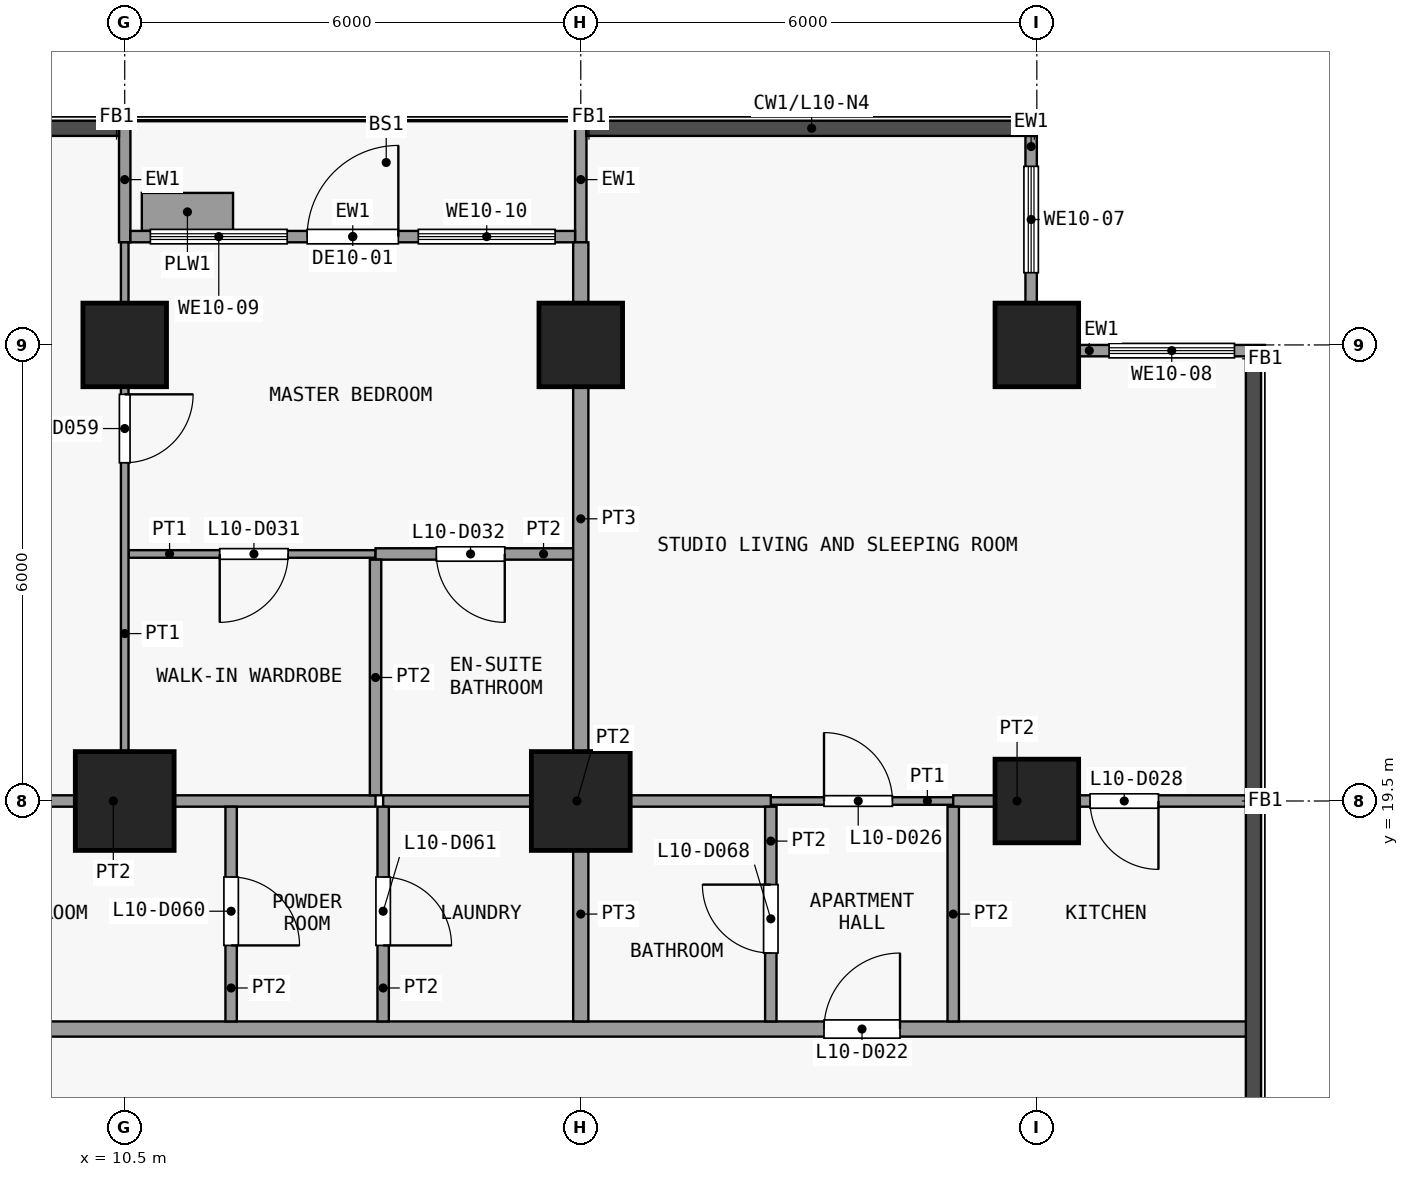
"""IFC4 building model, lengths in metres.
Left out: names, types, materials, properties, quantities, classifications, styles, units other than length and angle.
Written with IfcOpenShell. Run it as: python <this file> out.ifc"""

import sys

from ifc_helpers import new_model, si_unit, direction, frame, frame_2d, origin, origin_2d, place, context, subcontext, project, spatial, rectangle, extrude, element, fill, save


model = new_model("IFC4")
c1 = context("Model", 3, precision=1e-05, world=origin(), true_north=direction((0.0, 1.0)))
c2 = subcontext(c1, "Body", "Model", "MODEL_VIEW")
j1 = project(units=[si_unit("LENGTHUNIT", "METRE"), si_unit("PLANEANGLEUNIT", "RADIAN")], contexts=[c1])
p1 = place(None, origin())
s1 = spatial("IfcSite", under=j1, at=p1, CompositionType="ELEMENT")
p2 = place(p1, origin())
s2 = spatial("IfcBuilding", under=s1, at=p2, CompositionType="ELEMENT")
p3 = place(p2, frame((0.0, 0.0, 46.9)))
s3 = spatial("IfcBuildingStorey", under=s2, at=p3, CompositionType="ELEMENT", Elevation=46.9)
p4 = place(p3, frame((10.5, 19.5, 0.0), z_axis=(0.0, 0.0, 1.0), x_axis=(1.0, 0.0, 0.0)))
e1 = element("IfcColumn", 1, at=p4, inside=s3, PredefinedType="COLUMN", context=c2, shape_type="SweptSolid", body=[
    extrude(rectangle(XDim=1.3, YDim=1.3, at=origin_2d()), origin(), (0.0, 0.0, 1.0), 3.6),
])
p5 = place(p3, frame((10.5, 25.5, 0.0), z_axis=(0.0, 0.0, 1.0), x_axis=(1.0, 0.0, 0.0)))
e2 = element("IfcColumn", 2, at=p5, inside=s3, PredefinedType="COLUMN", context=c2, shape_type="SweptSolid", body=[
    extrude(rectangle(XDim=1.1, YDim=1.1, at=origin_2d()), origin(), (0.0, 0.0, 1.0), 3.6),
])
p6 = place(p3, frame((16.5, 19.5, 0.0), z_axis=(0.0, 0.0, 1.0), x_axis=(1.0, 0.0, 0.0)))
e3 = element("IfcColumn", 3, at=p6, inside=s3, PredefinedType="COLUMN", context=c2, shape_type="SweptSolid", body=[
    extrude(rectangle(XDim=1.3, YDim=1.3, at=origin_2d()), origin(), (0.0, 0.0, 1.0), 3.6),
])
for number, where, z_axis, x_axis in (
    (4, (16.5, 25.5, 0.0), (0.0, 0.0, 1.0), (1.0, 0.0, 0.0)),
    (5, (22.5, 19.5, 0.0), (0.0, 0.0, 1.0), (1.0, 0.0, 0.0)),
    (6, (22.5, 25.5, 0.0), (0.0, 0.0, 1.0), (1.0, 0.0, 0.0)),
):
    element("IfcColumn", number, at=place(p3, frame(where, z_axis=z_axis, x_axis=x_axis)), inside=s3, PredefinedType="COLUMN", context=c2, shape_type="SweptSolid", body=[
        extrude(rectangle(XDim=1.1, YDim=1.1, at=origin_2d()), origin(), (0.0, 0.0, 1.0), 3.6),
    ])
p7 = place(p3, frame((22.425, 28.25, 0.0), z_axis=(0.0, 0.0, 1.0), x_axis=(0.0, -1.0, 0.0)))
e7 = element("IfcWall", 7, at=p7, inside=s3, PredefinedType="SOLIDWALL", context=c2, shape_type="SweptSolid", body=[
    extrude(rectangle(XDim=2.2, YDim=0.15, at=frame_2d((1.1, 0.0))), origin(), (0.0, 0.0, 1.0), 3.3),
])
p8 = place(p7, frame((0.4, 0.0, 0.9)))
e8 = element("IfcOpeningElement", 8, at=p8, cuts=e7, PredefinedType="OPENING", context=c2, shape_type="SweptSolid", body=[
    extrude(rectangle(XDim=1.4, YDim=2.4, at=frame_2d((0.7, 1.2))), frame((0.0, 0.085, 0.0), z_axis=(0.0, -1.0, 0.0), x_axis=(1.0, 0.0, 0.0)), (0.0, 0.0, 1.0), 0.17),
])
p9 = place(p3, frame((23.05, 25.425, 0.0), z_axis=(0.0, 0.0, 1.0), x_axis=(1.0, 0.0, 0.0)))
e9 = element("IfcWall", 9, at=p9, inside=s3, PredefinedType="SOLIDWALL", context=c2, shape_type="SweptSolid", body=[
    extrude(rectangle(XDim=2.45, YDim=0.15, at=frame_2d((1.225, 0.0))), origin(), (0.0, 0.0, 1.0), 3.3),
])
p10 = place(p9, frame((0.4, 0.0, 0.9)))
e10 = element("IfcOpeningElement", 10, at=p10, cuts=e9, PredefinedType="OPENING", context=c2, shape_type="SweptSolid", body=[
    extrude(rectangle(XDim=1.65, YDim=2.4, at=frame_2d((0.825, 1.2))), frame((0.0, 0.085, 0.0), z_axis=(0.0, -1.0, 0.0), x_axis=(1.0, 0.0, 0.0)), (0.0, 0.0, 1.0), 0.17),
])
for number, where, z_axis, x_axis in (
    (11, (10.5, 26.85, 0.0), (0.0, 0.0, 1.0), (0.0, 1.0, 0.0)),
    (12, (16.5, 26.85, 0.0), (0.0, 0.0, 1.0), (0.0, 1.0, 0.0)),
):
    element("IfcWall", number, at=place(p3, frame(where, z_axis=z_axis, x_axis=x_axis)), inside=s3, PredefinedType="SOLIDWALL", context=c2, shape_type="SweptSolid", body=[
        extrude(rectangle(XDim=1.65, YDim=0.15, at=frame_2d((0.825, 0.0))), origin(), (0.0, 0.0, 1.0), 3.3),
    ])
p11 = place(p3, frame((10.575, 26.925, 0.0), z_axis=(0.0, 0.0, 1.0), x_axis=(1.0, 0.0, 0.0)))
e13 = element("IfcWall", 13, at=p11, inside=s3, PredefinedType="SOLIDWALL", context=c2, shape_type="SweptSolid", body=[
    extrude(rectangle(XDim=5.85, YDim=0.15, at=frame_2d((2.925, 0.0))), origin(), (0.0, 0.0, 1.0), 3.3),
])
p12 = place(p11, frame((2.325, 0.0, 0.0)))
e14 = element("IfcOpeningElement", 14, at=p12, cuts=e13, PredefinedType="OPENING", context=c2, shape_type="SweptSolid", body=[
    extrude(rectangle(XDim=1.2, YDim=2.4, at=frame_2d((0.6, 1.2))), frame((0.0, 0.085, 0.0), z_axis=(0.0, -1.0, 0.0), x_axis=(1.0, 0.0, 0.0)), (0.0, 0.0, 1.0), 0.17),
])
p13 = place(p11, frame((0.262, 0.0, 0.9)))
e15 = element("IfcOpeningElement", 15, at=p13, cuts=e13, PredefinedType="OPENING", context=c2, shape_type="SweptSolid", body=[
    extrude(rectangle(XDim=1.8, YDim=2.1, at=frame_2d((0.9, 1.05))), frame((0.0, 0.085, 0.0), z_axis=(0.0, -1.0, 0.0), x_axis=(1.0, 0.0, 0.0)), (0.0, 0.0, 1.0), 0.17),
])
p14 = place(p11, frame((3.788, 0.0, 0.9)))
e16 = element("IfcOpeningElement", 16, at=p14, cuts=e13, PredefinedType="OPENING", context=c2, shape_type="SweptSolid", body=[
    extrude(rectangle(XDim=1.8, YDim=2.1, at=frame_2d((0.9, 1.05))), frame((0.0, 0.085, 0.0), z_axis=(0.0, -1.0, 0.0), x_axis=(1.0, 0.0, 0.0)), (0.0, 0.0, 1.0), 0.17),
])
p15 = place(p3, frame((10.725, 27.25, 0.0), z_axis=(0.0, 0.0, 1.0), x_axis=(1.0, 0.0, 0.0)))
e17 = element("IfcWall", 17, at=p15, inside=s3, PredefinedType="USERDEFINED", context=c2, shape_type="SweptSolid", body=[
    extrude(rectangle(XDim=1.2, YDim=0.5, at=frame_2d((0.6, 0.0))), origin(), (0.0, 0.0, 1.0), 0.9),
])
p16 = place(p3, frame((-25.35, 16.5, 0.0), z_axis=(0.0, 0.0, 1.0), x_axis=(1.0, 0.0, 0.0)))
e18 = element("IfcWall", 18, at=p16, inside=s3, PredefinedType="PARTITIONING", context=c2, shape_type="SweptSolid", body=[
    extrude(rectangle(XDim=50.7, YDim=0.2, at=frame_2d((25.35, 0.0))), origin(), (0.0, 0.0, 1.0), 3.3),
])
p17 = place(p16, frame((7.05, 0.0, 0.0)))
e19 = element("IfcOpeningElement", 19, at=p17, cuts=e18, PredefinedType="OPENING", context=c2, shape_type="SweptSolid", body=[
    extrude(rectangle(XDim=1.0, YDim=2.1, at=frame_2d((0.5, 1.05))), frame((0.0, 0.11, 0.0), z_axis=(0.0, -1.0, 0.0), x_axis=(1.0, 0.0, 0.0)), (0.0, 0.0, 1.0), 0.22),
])
p18 = place(p16, frame((15.55, 0.0, 0.0)))
e20 = element("IfcOpeningElement", 20, at=p18, cuts=e18, PredefinedType="OPENING", context=c2, shape_type="SweptSolid", body=[
    extrude(rectangle(XDim=1.0, YDim=2.1, at=frame_2d((0.5, 1.05))), frame((0.0, 0.11, 0.0), z_axis=(0.0, -1.0, 0.0), x_axis=(1.0, 0.0, 0.0)), (0.0, 0.0, 1.0), 0.22),
])
p19 = place(p16, frame((30.55, 0.0, 0.0)))
e21 = element("IfcOpeningElement", 21, at=p19, cuts=e18, PredefinedType="OPENING", context=c2, shape_type="SweptSolid", body=[
    extrude(rectangle(XDim=1.0, YDim=2.1, at=frame_2d((0.5, 1.05))), frame((0.0, 0.11, 0.0), z_axis=(0.0, -1.0, 0.0), x_axis=(1.0, 0.0, 0.0)), (0.0, 0.0, 1.0), 0.22),
])
p20 = place(p16, frame((45.05, 0.0, 0.0)))
e22 = element("IfcOpeningElement", 22, at=p20, cuts=e18, PredefinedType="OPENING", context=c2, shape_type="SweptSolid", body=[
    extrude(rectangle(XDim=1.0, YDim=2.1, at=frame_2d((0.5, 1.05))), frame((0.0, 0.11, 0.0), z_axis=(0.0, -1.0, 0.0), x_axis=(1.0, 0.0, 0.0)), (0.0, 0.0, 1.0), 0.22),
])
p21 = place(p3, frame((19.0, 19.5, 0.0), z_axis=(0.0, 0.0, 1.0), x_axis=(1.0, 0.0, 0.0)))
e23 = element("IfcWall", 23, at=p21, inside=s3, PredefinedType="PARTITIONING", context=c2, shape_type="SweptSolid", body=[
    extrude(rectangle(XDim=2.4, YDim=0.1, at=frame_2d((1.2, 0.0))), origin(), (0.0, 0.0, 1.0), 3.3),
])
p22 = place(p21, frame((0.7, 0.0, 0.0)))
e24 = element("IfcOpeningElement", 24, at=p22, cuts=e23, PredefinedType="OPENING", context=c2, shape_type="SweptSolid", body=[
    extrude(rectangle(XDim=0.9, YDim=2.1, at=frame_2d((0.45, 1.05))), frame((0.0, 0.06, 0.0), z_axis=(0.0, -1.0, 0.0), x_axis=(1.0, 0.0, 0.0)), (0.0, 0.0, 1.0), 0.12),
])
p23 = place(p3, frame((6.9, 19.5, 0.0), z_axis=(0.0, 0.0, 1.0), x_axis=(1.0, 0.0, 0.0)))
e25 = element("IfcWall", 25, at=p23, inside=s3, PredefinedType="PARTITIONING", context=c2, shape_type="SweptSolid", body=[
    extrude(rectangle(XDim=6.9, YDim=0.15, at=frame_2d((3.45, 0.0))), origin(), (0.0, 0.0, 1.0), 3.3),
])
p24 = place(p3, frame((13.9, 19.5, 0.0), z_axis=(0.0, 0.0, 1.0), x_axis=(1.0, 0.0, 0.0)))
e26 = element("IfcWall", 26, at=p24, inside=s3, PredefinedType="PARTITIONING", context=c2, shape_type="SweptSolid", body=[
    extrude(rectangle(XDim=5.1, YDim=0.15, at=frame_2d((2.55, 0.0))), origin(), (0.0, 0.0, 1.0), 3.3),
])
p25 = place(p3, frame((21.4, 19.5, 0.0), z_axis=(0.0, 0.0, 1.0), x_axis=(1.0, 0.0, 0.0)))
e27 = element("IfcWall", 27, at=p25, inside=s3, PredefinedType="PARTITIONING", context=c2, shape_type="SweptSolid", body=[
    extrude(rectangle(XDim=3.85, YDim=0.15, at=frame_2d((1.925, 0.0))), origin(), (0.0, 0.0, 1.0), 3.3),
])
p26 = place(p25, frame((1.8, 0.0, 0.0)))
e28 = element("IfcOpeningElement", 28, at=p26, cuts=e27, PredefinedType="OPENING", context=c2, shape_type="SweptSolid", body=[
    extrude(rectangle(XDim=0.9, YDim=2.1, at=frame_2d((0.45, 1.05))), frame((0.0, 0.085, 0.0), z_axis=(0.0, -1.0, 0.0), x_axis=(1.0, 0.0, 0.0)), (0.0, 0.0, 1.0), 0.17),
])
p27 = place(p3, frame((10.55, 22.75, 0.0), z_axis=(0.0, 0.0, 1.0), x_axis=(1.0, 0.0, 0.0)))
e29 = element("IfcWall", 29, at=p27, inside=s3, PredefinedType="PARTITIONING", context=c2, shape_type="SweptSolid", body=[
    extrude(rectangle(XDim=3.25, YDim=0.1, at=frame_2d((1.625, 0.0))), origin(), (0.0, 0.0, 1.0), 3.3),
])
p28 = place(p27, frame((1.2, 0.0, 0.0)))
e30 = element("IfcOpeningElement", 30, at=p28, cuts=e29, PredefinedType="OPENING", context=c2, shape_type="SweptSolid", body=[
    extrude(rectangle(XDim=0.9, YDim=2.1, at=frame_2d((0.45, 1.05))), frame((0.0, 0.06, 0.0), z_axis=(0.0, -1.0, 0.0), x_axis=(1.0, 0.0, 0.0)), (0.0, 0.0, 1.0), 0.12),
])
p29 = place(p3, frame((13.8, 22.75, 0.0), z_axis=(0.0, 0.0, 1.0), x_axis=(1.0, 0.0, 0.0)))
e31 = element("IfcWall", 31, at=p29, inside=s3, PredefinedType="PARTITIONING", context=c2, shape_type="SweptSolid", body=[
    extrude(rectangle(XDim=2.6, YDim=0.15, at=frame_2d((1.3, 0.0))), origin(), (0.0, 0.0, 1.0), 3.3),
])
p30 = place(p29, frame((0.8, 0.0, 0.0)))
e32 = element("IfcOpeningElement", 32, at=p30, cuts=e31, PredefinedType="OPENING", context=c2, shape_type="SweptSolid", body=[
    extrude(rectangle(XDim=0.9, YDim=2.1, at=frame_2d((0.45, 1.05))), frame((0.0, 0.085, 0.0), z_axis=(0.0, -1.0, 0.0), x_axis=(1.0, 0.0, 0.0)), (0.0, 0.0, 1.0), 0.17),
])
p31 = place(p3, frame((10.5, 19.575, 0.0), z_axis=(0.0, 0.0, 1.0), x_axis=(0.0, 1.0, 0.0)))
e33 = element("IfcWall", 33, at=p31, inside=s3, PredefinedType="PARTITIONING", context=c2, shape_type="SweptSolid", body=[
    extrude(rectangle(XDim=7.275, YDim=0.1, at=frame_2d((3.638, 0.0))), origin(), (0.0, 0.0, 1.0), 3.3),
])
p32 = place(p31, frame((4.375, 0.0, 0.0)))
e34 = element("IfcOpeningElement", 34, at=p32, cuts=e33, PredefinedType="OPENING", context=c2, shape_type="SweptSolid", body=[
    extrude(rectangle(XDim=0.9, YDim=2.1, at=frame_2d((0.45, 1.05))), frame((0.0, 0.06, 0.0), z_axis=(0.0, -1.0, 0.0), x_axis=(1.0, 0.0, 0.0)), (0.0, 0.0, 1.0), 0.12),
])
p33 = place(p3, frame((11.9, 16.6, 0.0), z_axis=(0.0, 0.0, 1.0), x_axis=(0.0, 1.0, 0.0)))
e35 = element("IfcWall", 35, at=p33, inside=s3, PredefinedType="PARTITIONING", context=c2, shape_type="SweptSolid", body=[
    extrude(rectangle(XDim=2.825, YDim=0.15, at=frame_2d((1.413, 0.0))), origin(), (0.0, 0.0, 1.0), 3.3),
])
p34 = place(p33, frame((1.0, 0.0, 0.0)))
e36 = element("IfcOpeningElement", 36, at=p34, cuts=e35, PredefinedType="OPENING", context=c2, shape_type="SweptSolid", body=[
    extrude(rectangle(XDim=0.9, YDim=2.1, at=frame_2d((0.45, 1.05))), frame((0.0, 0.085, 0.0), z_axis=(0.0, -1.0, 0.0), x_axis=(1.0, 0.0, 0.0)), (0.0, 0.0, 1.0), 0.17),
])
p35 = place(p3, frame((13.8, 19.575, 0.0), z_axis=(0.0, 0.0, 1.0), x_axis=(0.0, 1.0, 0.0)))
e37 = element("IfcWall", 37, at=p35, inside=s3, PredefinedType="PARTITIONING", context=c2, shape_type="SweptSolid", body=[
    extrude(rectangle(XDim=3.1, YDim=0.15, at=frame_2d((1.55, 0.0))), origin(), (0.0, 0.0, 1.0), 3.3),
])
p36 = place(p3, frame((13.9, 16.6, 0.0), z_axis=(0.0, 0.0, 1.0), x_axis=(0.0, 1.0, 0.0)))
e38 = element("IfcWall", 38, at=p36, inside=s3, PredefinedType="PARTITIONING", context=c2, shape_type="SweptSolid", body=[
    extrude(rectangle(XDim=2.825, YDim=0.15, at=frame_2d((1.413, 0.0))), origin(), (0.0, 0.0, 1.0), 3.3),
])
p37 = place(p36, frame((1.0, 0.0, 0.0)))
e39 = element("IfcOpeningElement", 39, at=p37, cuts=e38, PredefinedType="OPENING", context=c2, shape_type="SweptSolid", body=[
    extrude(rectangle(XDim=0.9, YDim=2.1, at=frame_2d((0.45, 1.05))), frame((0.0, 0.085, 0.0), z_axis=(0.0, -1.0, 0.0), x_axis=(1.0, 0.0, 0.0)), (0.0, 0.0, 1.0), 0.17),
])
p38 = place(p3, frame((16.5, 16.6, 0.0), z_axis=(0.0, 0.0, 1.0), x_axis=(0.0, 1.0, 0.0)))
e40 = element("IfcWall", 40, at=p38, inside=s3, PredefinedType="PARTITIONING", context=c2, shape_type="SweptSolid", body=[
    extrude(rectangle(XDim=2.825, YDim=0.2, at=frame_2d((1.413, 0.0))), origin(), (0.0, 0.0, 1.0), 3.3),
])
p39 = place(p3, frame((16.5, 19.575, 0.0), z_axis=(0.0, 0.0, 1.0), x_axis=(0.0, 1.0, 0.0)))
e41 = element("IfcWall", 41, at=p39, inside=s3, PredefinedType="PARTITIONING", context=c2, shape_type="SweptSolid", body=[
    extrude(rectangle(XDim=7.275, YDim=0.2, at=frame_2d((3.638, 0.0))), origin(), (0.0, 0.0, 1.0), 3.3),
])
p40 = place(p3, frame((19.0, 16.6, 0.0), z_axis=(0.0, 0.0, 1.0), x_axis=(0.0, 1.0, 0.0)))
e42 = element("IfcWall", 42, at=p40, inside=s3, PredefinedType="PARTITIONING", context=c2, shape_type="SweptSolid", body=[
    extrude(rectangle(XDim=2.825, YDim=0.15, at=frame_2d((1.413, 0.0))), origin(), (0.0, 0.0, 1.0), 3.3),
])
p41 = place(p40, frame((0.9, 0.0, 0.0)))
e43 = element("IfcOpeningElement", 43, at=p41, cuts=e42, PredefinedType="OPENING", context=c2, shape_type="SweptSolid", body=[
    extrude(rectangle(XDim=0.9, YDim=2.1, at=frame_2d((0.45, 1.05))), frame((0.0, 0.085, 0.0), z_axis=(0.0, -1.0, 0.0), x_axis=(1.0, 0.0, 0.0)), (0.0, 0.0, 1.0), 0.17),
])
p42 = place(p3, frame((21.4, 16.6, 0.0), z_axis=(0.0, 0.0, 1.0), x_axis=(0.0, 1.0, 0.0)))
e44 = element("IfcWall", 44, at=p42, inside=s3, PredefinedType="PARTITIONING", context=c2, shape_type="SweptSolid", body=[
    extrude(rectangle(XDim=2.825, YDim=0.15, at=frame_2d((1.413, 0.0))), origin(), (0.0, 0.0, 1.0), 3.3),
])
p43 = place(p8, origin())
e45 = element("IfcWindow", 45, at=p43, inside=s3, PartitioningType="SINGLE_PANEL", PredefinedType="WINDOW", context=c2, shape_type="SweptSolid", body=[
    extrude(rectangle(XDim=1.4, YDim=2.4, at=frame_2d((0.7, 1.2))), frame((0.0, 0.03, 0.0), z_axis=(0.0, -1.0, 0.0), x_axis=(1.0, 0.0, 0.0)), (0.0, 0.0, 1.0), 0.06),
])
fill(e8, e45)
p44 = place(p10, origin())
e46 = element("IfcWindow", 46, at=p44, inside=s3, PartitioningType="SINGLE_PANEL", PredefinedType="WINDOW", context=c2, shape_type="SweptSolid", body=[
    extrude(rectangle(XDim=1.65, YDim=2.4, at=frame_2d((0.825, 1.2))), frame((0.0, 0.03, 0.0), z_axis=(0.0, -1.0, 0.0), x_axis=(1.0, 0.0, 0.0)), (0.0, 0.0, 1.0), 0.06),
])
fill(e10, e46)
p45 = place(p12, origin())
e47 = element("IfcDoor", 47, at=p45, inside=s3, OperationType="SINGLE_SWING_RIGHT", PredefinedType="DOOR", context=c2, shape_type="SweptSolid", body=[
    extrude(rectangle(XDim=1.2, YDim=2.4, at=frame_2d((0.6, 1.2))), frame((0.0, 0.025, 0.0), z_axis=(0.0, -1.0, 0.0), x_axis=(1.0, 0.0, 0.0)), (0.0, 0.0, 1.0), 0.05),
])
fill(e14, e47)
p46 = place(p13, origin())
e48 = element("IfcWindow", 48, at=p46, inside=s3, PartitioningType="SINGLE_PANEL", PredefinedType="WINDOW", context=c2, shape_type="SweptSolid", body=[
    extrude(rectangle(XDim=1.8, YDim=2.1, at=frame_2d((0.9, 1.05))), frame((0.0, 0.03, 0.0), z_axis=(0.0, -1.0, 0.0), x_axis=(1.0, 0.0, 0.0)), (0.0, 0.0, 1.0), 0.06),
])
fill(e15, e48)
p47 = place(p14, origin())
e49 = element("IfcWindow", 49, at=p47, inside=s3, PartitioningType="SINGLE_PANEL", PredefinedType="WINDOW", context=c2, shape_type="SweptSolid", body=[
    extrude(rectangle(XDim=1.8, YDim=2.1, at=frame_2d((0.9, 1.05))), frame((0.0, 0.03, 0.0), z_axis=(0.0, -1.0, 0.0), x_axis=(1.0, 0.0, 0.0)), (0.0, 0.0, 1.0), 0.06),
])
fill(e16, e49)
p48 = place(p20, origin())
e50 = element("IfcDoor", 50, at=p48, inside=s3, OperationType="SINGLE_SWING_LEFT", PredefinedType="DOOR", context=c2, shape_type="SweptSolid", body=[
    extrude(rectangle(XDim=1.0, YDim=2.1, at=frame_2d((0.5, 1.05))), frame((0.0, 0.025, 0.0), z_axis=(0.0, -1.0, 0.0), x_axis=(1.0, 0.0, 0.0)), (0.0, 0.0, 1.0), 0.05),
])
fill(e22, e50)
p49 = place(p22, origin())
e51 = element("IfcDoor", 51, at=p49, inside=s3, OperationType="SINGLE_SWING_RIGHT", PredefinedType="DOOR", context=c2, shape_type="SweptSolid", body=[
    extrude(rectangle(XDim=0.9, YDim=2.1, at=frame_2d((0.45, 1.05))), frame((0.0, 0.025, 0.0), z_axis=(0.0, -1.0, 0.0), x_axis=(1.0, 0.0, 0.0)), (0.0, 0.0, 1.0), 0.05),
])
fill(e24, e51)
p50 = place(p26, origin())
e52 = element("IfcDoor", 52, at=p50, inside=s3, OperationType="SINGLE_SWING_RIGHT", PredefinedType="DOOR", context=c2, shape_type="SweptSolid", body=[
    extrude(rectangle(XDim=0.9, YDim=2.1, at=frame_2d((0.45, 1.05))), frame((0.0, 0.025, 0.0), z_axis=(0.0, -1.0, 0.0), x_axis=(1.0, 0.0, 0.0)), (0.0, 0.0, 1.0), 0.05),
])
fill(e28, e52)
p51 = place(p28, origin())
e53 = element("IfcDoor", 53, at=p51, inside=s3, OperationType="SINGLE_SWING_LEFT", PredefinedType="DOOR", context=c2, shape_type="SweptSolid", body=[
    extrude(rectangle(XDim=0.9, YDim=2.1, at=frame_2d((0.45, 1.05))), frame((0.0, 0.025, 0.0), z_axis=(0.0, -1.0, 0.0), x_axis=(1.0, 0.0, 0.0)), (0.0, 0.0, 1.0), 0.05),
])
fill(e30, e53)
p52 = place(p30, origin())
e54 = element("IfcDoor", 54, at=p52, inside=s3, OperationType="SINGLE_SWING_RIGHT", PredefinedType="DOOR", context=c2, shape_type="SweptSolid", body=[
    extrude(rectangle(XDim=0.9, YDim=2.1, at=frame_2d((0.45, 1.05))), frame((0.0, 0.025, 0.0), z_axis=(0.0, -1.0, 0.0), x_axis=(1.0, 0.0, 0.0)), (0.0, 0.0, 1.0), 0.05),
])
fill(e32, e54)
p53 = place(p32, origin())
e55 = element("IfcDoor", 55, at=p53, inside=s3, OperationType="SINGLE_SWING_RIGHT", PredefinedType="DOOR", context=c2, shape_type="SweptSolid", body=[
    extrude(rectangle(XDim=0.9, YDim=2.1, at=frame_2d((0.45, 1.05))), frame((0.0, 0.025, 0.0), z_axis=(0.0, -1.0, 0.0), x_axis=(1.0, 0.0, 0.0)), (0.0, 0.0, 1.0), 0.05),
])
fill(e34, e55)
p54 = place(p34, origin())
e56 = element("IfcDoor", 56, at=p54, inside=s3, OperationType="SINGLE_SWING_LEFT", PredefinedType="DOOR", context=c2, shape_type="SweptSolid", body=[
    extrude(rectangle(XDim=0.9, YDim=2.1, at=frame_2d((0.45, 1.05))), frame((0.0, 0.025, 0.0), z_axis=(0.0, -1.0, 0.0), x_axis=(1.0, 0.0, 0.0)), (0.0, 0.0, 1.0), 0.05),
])
fill(e36, e56)
p55 = place(p37, origin())
e57 = element("IfcDoor", 57, at=p55, inside=s3, OperationType="SINGLE_SWING_LEFT", PredefinedType="DOOR", context=c2, shape_type="SweptSolid", body=[
    extrude(rectangle(XDim=0.9, YDim=2.1, at=frame_2d((0.45, 1.05))), frame((0.0, 0.025, 0.0), z_axis=(0.0, -1.0, 0.0), x_axis=(1.0, 0.0, 0.0)), (0.0, 0.0, 1.0), 0.05),
])
fill(e39, e57)
p56 = place(p41, origin())
e58 = element("IfcDoor", 58, at=p56, inside=s3, OperationType="SINGLE_SWING_LEFT", PredefinedType="DOOR", context=c2, shape_type="SweptSolid", body=[
    extrude(rectangle(XDim=0.9, YDim=2.1, at=frame_2d((0.45, 1.05))), frame((0.0, 0.025, 0.0), z_axis=(0.0, -1.0, 0.0), x_axis=(1.0, 0.0, 0.0)), (0.0, 0.0, 1.0), 0.05),
])
fill(e43, e58)
save(model, sys.argv[1])
